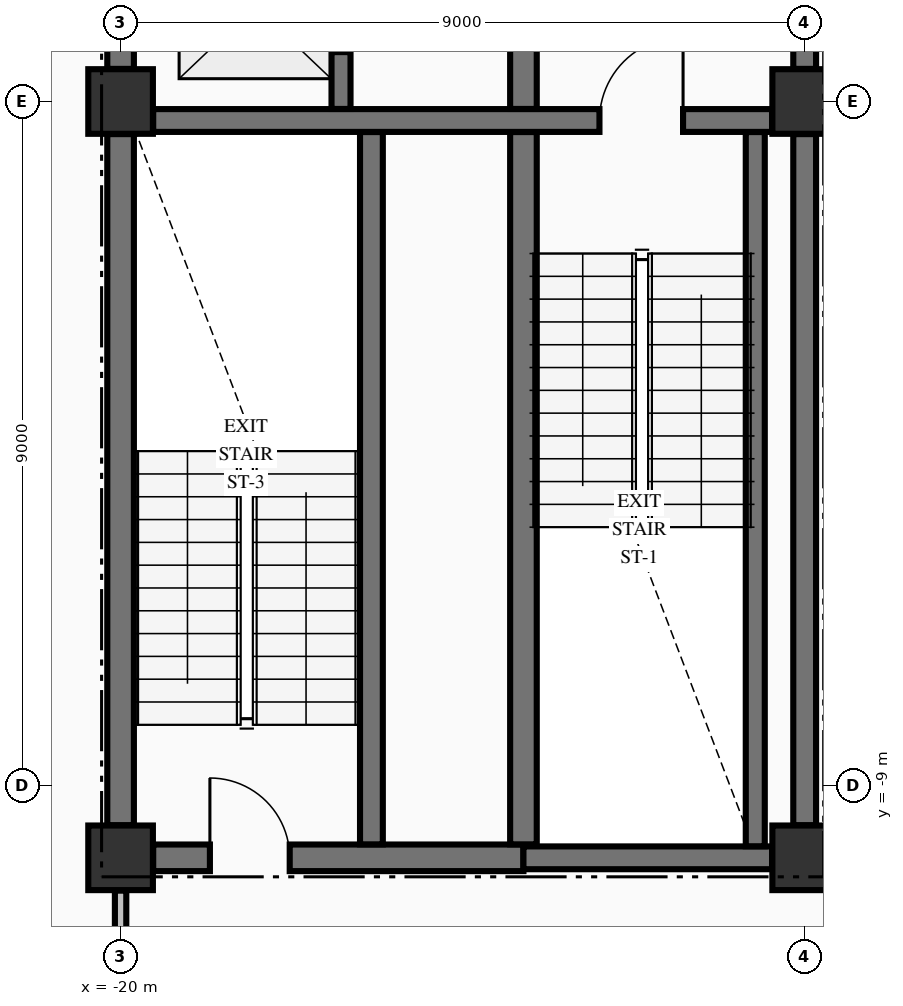
"""IFC4 building model, lengths in metres.
Left out: names, types, materials, properties, quantities, classifications, styles, units other than length and angle.
Written with IfcOpenShell. Run it as: python <this file> out.ifc"""

import sys

from ifc_helpers import new_model, si_unit, direction, frame, frame_2d, origin, origin_2d, place, context, subcontext, project, spatial, rectangle, extrude, element, fill, save


model = new_model("IFC4")
c1 = context("Model", 3, precision=1e-05, world=origin(), true_north=direction((0.0, 1.0)))
c2 = subcontext(c1, "Body", "Model", "MODEL_VIEW")
j1 = project(units=[si_unit("LENGTHUNIT", "METRE"), si_unit("PLANEANGLEUNIT", "RADIAN")], contexts=[c1])
p1 = place(None, origin())
s1 = spatial("IfcSite", under=j1, at=p1, CompositionType="ELEMENT")
p2 = place(p1, origin())
s2 = spatial("IfcBuilding", under=s1, at=p2, CompositionType="ELEMENT")
p3 = place(p2, frame((0.0, 0.0, 158.24)))
s3 = spatial("IfcBuildingStorey", under=s2, at=p3, CompositionType="ELEMENT", Elevation=158.24)
for number, where, z_axis, x_axis in (
    (1, (-20.0, -9.95, -0.425), (0.0, 0.0, 1.0), (1.0, 0.0, 0.0)),
    (2, (-11.0, -9.95, -0.425), (0.0, 0.0, 1.0), (1.0, 0.0, 0.0)),
    (3, (-11.0, 0.0, -0.425), (0.0, 0.0, 1.0), (1.0, 0.0, 0.0)),
    (4, (-20.0, 0.0, -0.425), (0.0, 0.0, 1.0), (1.0, 0.0, 0.0)),
):
    element("IfcColumn", number, at=place(p3, frame(where, z_axis=z_axis, x_axis=x_axis)), inside=s3, PredefinedType="COLUMN", context=c2, shape_type="SweptSolid", body=[
        extrude(rectangle(XDim=0.85, YDim=0.85, at=origin_2d()), origin(), (0.0, 0.0, 1.0), 4.595),
    ])
p4 = place(p3, frame((-19.571, -9.95, 0.0), z_axis=(0.0, 0.0, 1.0), x_axis=(1.0, 0.0, 0.0)))
e5 = element("IfcWall", 5, at=p4, inside=s3, PredefinedType="SHEAR", context=c2, shape_type="SweptSolid", body=[
    extrude(rectangle(XDim=4.871, YDim=0.35, at=frame_2d((2.436, 0.0))), origin(), (0.0, 0.0, 1.0), 4.17),
])
p5 = place(p4, frame((0.746, 0.0, 0.0)))
e6 = element("IfcOpeningElement", 6, at=p5, cuts=e5, PredefinedType="OPENING", context=c2, shape_type="SweptSolid", body=[
    extrude(rectangle(XDim=1.05, YDim=2.15, at=frame_2d((0.525, 1.075))), frame((0.0, 0.185, 0.0), z_axis=(0.0, -1.0, 0.0), x_axis=(1.0, 0.0, 0.0)), (0.0, 0.0, 1.0), 0.37),
])
p6 = place(p3, frame((-14.7, -9.95, 0.0), z_axis=(0.0, 0.0, 1.0), x_axis=(1.0, 0.0, 0.0)))
e7 = element("IfcWall", 7, at=p6, inside=s3, PredefinedType="SHEAR", context=c2, shape_type="SweptSolid", body=[
    extrude(rectangle(XDim=3.271, YDim=0.3, at=frame_2d((1.635, 0.0))), origin(), (0.0, 0.0, 1.0), 4.17),
])
p7 = place(p3, frame((-19.571, -0.25, 0.0), z_axis=(0.0, 0.0, 1.0), x_axis=(1.0, 0.0, 0.0)))
e8 = element("IfcWall", 8, at=p7, inside=s3, PredefinedType="SHEAR", context=c2, shape_type="SweptSolid", body=[
    extrude(rectangle(XDim=8.142, YDim=0.3, at=frame_2d((4.071, 0.0))), origin(), (0.0, 0.0, 1.0), 4.17),
])
p8 = place(p7, frame((5.871, 0.0, 0.0)))
e9 = element("IfcOpeningElement", 9, at=p8, cuts=e8, PredefinedType="OPENING", context=c2, shape_type="SweptSolid", body=[
    extrude(rectangle(XDim=1.1, YDim=2.15, at=frame_2d((0.55, 1.075))), frame((0.0, 0.16, 0.0), z_axis=(0.0, -1.0, 0.0), x_axis=(1.0, 0.0, 0.0)), (0.0, 0.0, 1.0), 0.32),
])
p9 = place(p3, frame((-20.0, -9.521, 0.0), z_axis=(0.0, 0.0, 1.0), x_axis=(0.0, 1.0, 0.0)))
e10 = element("IfcWall", 10, at=p9, inside=s3, PredefinedType="SHEAR", context=c2, shape_type="SweptSolid", body=[
    extrude(rectangle(XDim=9.092, YDim=0.35, at=frame_2d((4.546, 0.0))), origin(), (0.0, 0.0, 1.0), 4.17),
])
p10 = place(p3, frame((-20.0, 0.429, 0.0), z_axis=(0.0, 0.0, 1.0), x_axis=(0.0, 1.0, 0.0)))
e11 = element("IfcWall", 11, at=p10, inside=s3, PredefinedType="SHEAR", context=c2, shape_type="SweptSolid", body=[
    extrude(rectangle(XDim=2.094, YDim=0.35, at=frame_2d((1.047, 0.0))), origin(), (0.0, 0.0, 1.0), 4.17),
])
p11 = place(p3, frame((-17.1, -0.098, 0.0), z_axis=(0.0, 0.0, 1.0), x_axis=(0.0, 1.0, 0.0)))
e12 = element("IfcWall", 12, at=p11, inside=s3, PredefinedType="SOLIDWALL", context=c2, shape_type="SweptSolid", body=[
    extrude(rectangle(XDim=2.621, YDim=0.25, at=frame_2d((1.311, 0.0))), origin(), (0.0, 0.0, 1.0), 4.17),
])
p12 = place(p11, frame((0.748, 0.0, 0.0)))
e13 = element("IfcOpeningElement", 13, at=p12, cuts=e12, PredefinedType="OPENING", context=c2, shape_type="SweptSolid", body=[
    extrude(rectangle(XDim=1.1, YDim=2.2, at=frame_2d((0.55, 1.1))), frame((0.0, 0.135, 0.0), z_axis=(0.0, -1.0, 0.0), x_axis=(1.0, 0.0, 0.0)), (0.0, 0.0, 1.0), 0.27),
])
p13 = place(p3, frame((-16.7, -9.773, 0.0), z_axis=(0.0, 0.0, 1.0), x_axis=(0.0, 1.0, 0.0)))
e14 = element("IfcWall", 14, at=p13, inside=s3, PredefinedType="SHEAR", context=c2, shape_type="SweptSolid", body=[
    extrude(rectangle(XDim=9.371, YDim=0.3, at=frame_2d((4.686, 0.0))), origin(), (0.0, 0.0, 1.0), 4.17),
])
p14 = place(p3, frame((-14.7, -9.773, 0.0), z_axis=(0.0, 0.0, 1.0), x_axis=(0.0, 1.0, 0.0)))
e15 = element("IfcWall", 15, at=p14, inside=s3, PredefinedType="SHEAR", context=c2, shape_type="SweptSolid", body=[
    extrude(rectangle(XDim=9.371, YDim=0.35, at=frame_2d((4.686, 0.0))), origin(), (0.0, 0.0, 1.0), 4.17),
])
p15 = place(p3, frame((-14.7, -0.098, 0.0), z_axis=(0.0, 0.0, 1.0), x_axis=(0.0, 1.0, 0.0)))
e16 = element("IfcWall", 16, at=p15, inside=s3, PredefinedType="SHEAR", context=c2, shape_type="SweptSolid", body=[
    extrude(rectangle(XDim=2.846, YDim=0.35, at=frame_2d((1.423, 0.0))), origin(), (0.0, 0.0, 1.0), 4.17),
])
p16 = place(p3, frame((-11.65, -9.798, 0.0), z_axis=(0.0, 0.0, 1.0), x_axis=(0.0, 1.0, 0.0)))
e17 = element("IfcWall", 17, at=p16, inside=s3, PredefinedType="SOLIDWALL", context=c2, shape_type="SweptSolid", body=[
    extrude(rectangle(XDim=9.396, YDim=0.25, at=frame_2d((4.698, 0.0))), origin(), (0.0, 0.0, 1.0), 4.17),
])
p17 = place(p3, frame((-11.0, -9.521, 0.0), z_axis=(0.0, 0.0, 1.0), x_axis=(0.0, 1.0, 0.0)))
e18 = element("IfcWall", 18, at=p17, inside=s3, PredefinedType="SHEAR", context=c2, shape_type="SweptSolid", body=[
    extrude(rectangle(XDim=9.092, YDim=0.3, at=frame_2d((4.546, 0.0))), origin(), (0.0, 0.0, 1.0), 4.17),
])
p18 = place(p3, frame((-11.0, 0.429, 0.0), z_axis=(0.0, 0.0, 1.0), x_axis=(0.0, 1.0, 0.0)))
e19 = element("IfcWall", 19, at=p18, inside=s3, PredefinedType="SHEAR", context=c2, shape_type="SweptSolid", body=[
    extrude(rectangle(XDim=2.319, YDim=0.3, at=frame_2d((1.16, 0.0))), origin(), (0.0, 0.0, 1.0), 4.17),
])
p19 = place(p18, frame((0.671, 0.0, 0.0)))
e20 = element("IfcOpeningElement", 20, at=p19, cuts=e19, PredefinedType="OPENING", context=c2, shape_type="SweptSolid", body=[
    extrude(rectangle(XDim=1.1, YDim=2.15, at=frame_2d((0.55, 1.075))), frame((0.0, 0.16, 0.0), z_axis=(0.0, -1.0, 0.0), x_axis=(1.0, 0.0, 0.0)), (0.0, 0.0, 1.0), 0.32),
])
p20 = place(p3, frame((-20.0, -12.222, 0.0), z_axis=(0.0, 0.0, 1.0), x_axis=(0.0, 1.0, 0.0)))
e21 = element("IfcWall", 21, at=p20, inside=s3, PredefinedType="PARTITIONING", context=c2, shape_type="SweptSolid", body=[
    extrude(rectangle(XDim=1.841, YDim=0.15, at=frame_2d((0.92, 0.0))), origin(), (0.0, 0.0, 1.0), 3.36),
])
p21 = place(p8, origin())
e22 = element("IfcDoor", 22, at=p21, inside=s3, OperationType="SINGLE_SWING_RIGHT", PredefinedType="DOOR", context=c2, shape_type="SweptSolid", body=[
    extrude(rectangle(XDim=1.1, YDim=2.15, at=frame_2d((0.55, 1.075))), frame((0.0, 0.025, 0.0), z_axis=(0.0, -1.0, 0.0), x_axis=(1.0, 0.0, 0.0)), (0.0, 0.0, 1.0), 0.05),
])
fill(e9, e22)
p22 = place(p5, origin())
e23 = element("IfcDoor", 23, at=p22, inside=s3, OperationType="SINGLE_SWING_LEFT", PredefinedType="DOOR", context=c2, shape_type="SweptSolid", body=[
    extrude(rectangle(XDim=1.05, YDim=2.15, at=frame_2d((0.525, 1.075))), frame((0.0, 0.025, 0.0), z_axis=(0.0, -1.0, 0.0), x_axis=(1.0, 0.0, 0.0)), (0.0, 0.0, 1.0), 0.05),
])
fill(e6, e23)
save(model, sys.argv[1])
